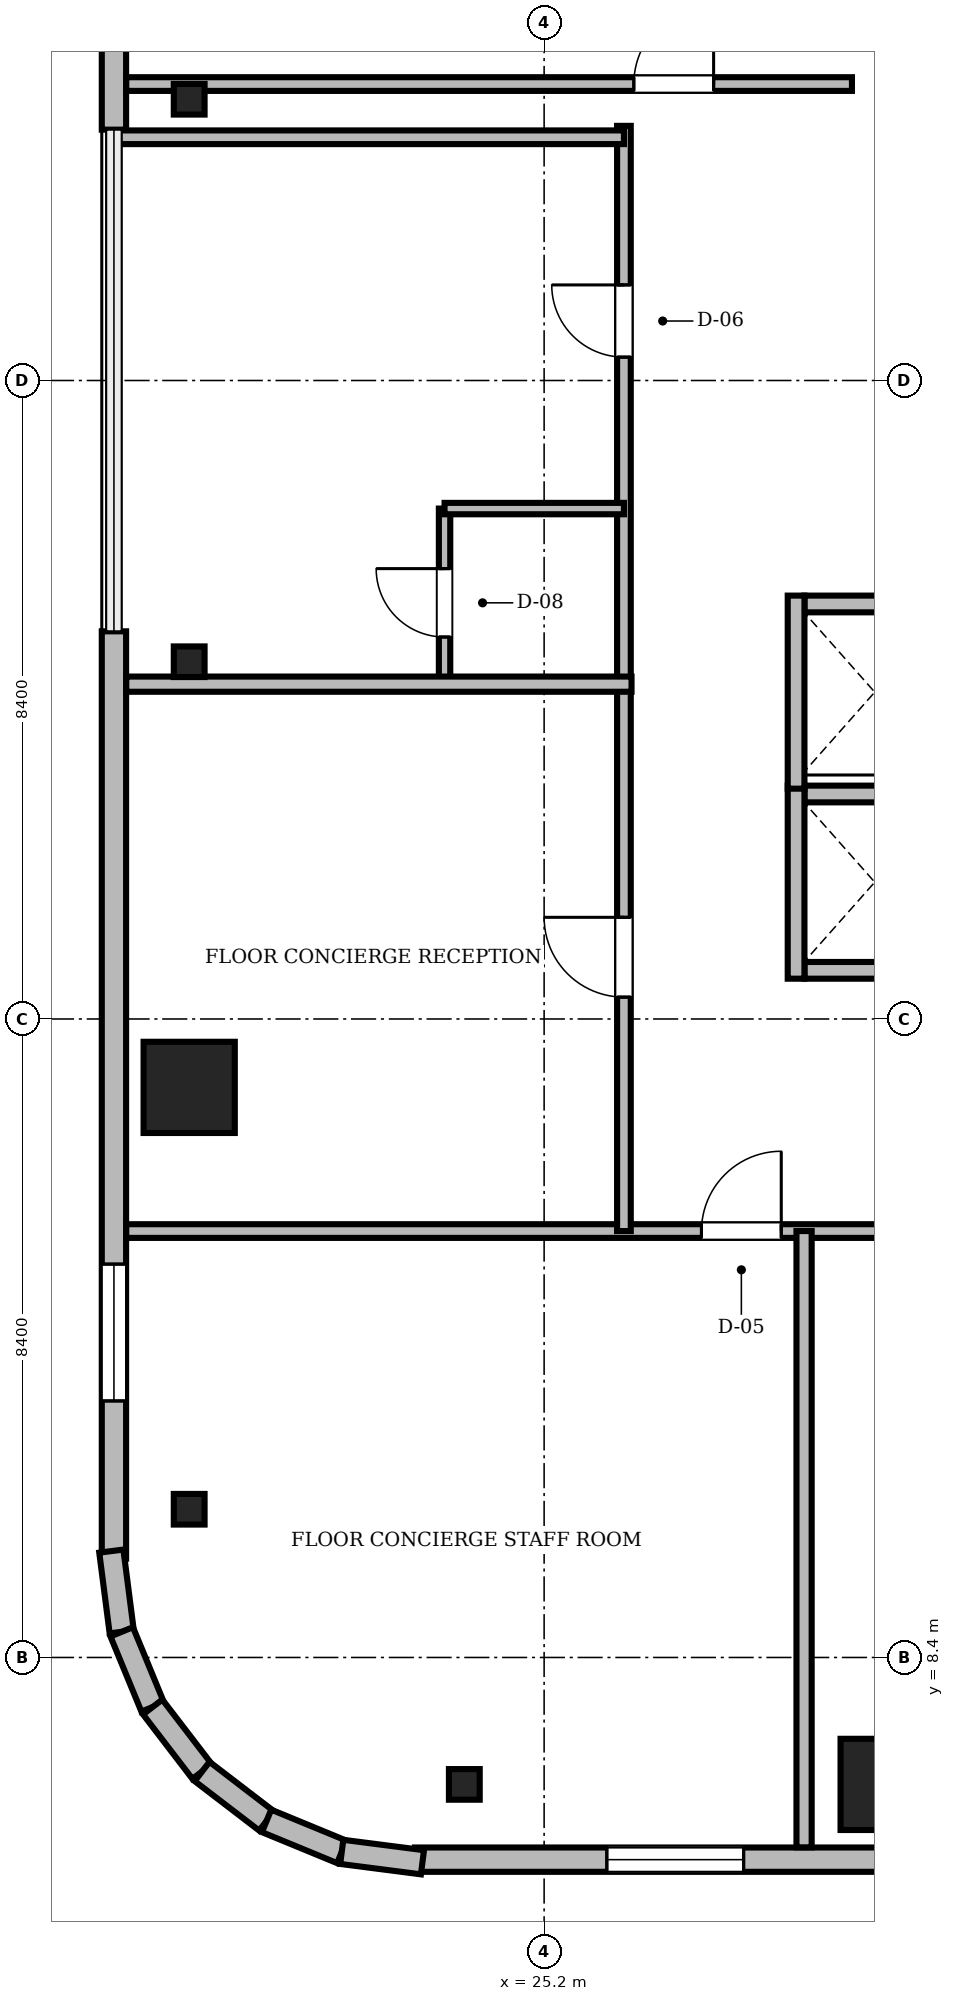
"""IFC4 building model, lengths in metres.
Left out: names, types, materials, properties, quantities, classifications, styles, units other than length and angle.
Written with IfcOpenShell. Run it as: python <this file> out.ifc"""

import sys

from ifc_helpers import new_model, si_unit, direction, frame, frame_2d, origin, origin_2d, place, context, subcontext, project, spatial, rectangle, i_section, extrude, source, transform, mapped, element, fill, save


model = new_model("IFC4")
c1 = context("Model", 3, precision=1e-05, world=origin(), true_north=direction((0.0, 1.0)))
c2 = subcontext(c1, "Body", "Model", "MODEL_VIEW")
j1 = project(units=[si_unit("LENGTHUNIT", "METRE"), si_unit("PLANEANGLEUNIT", "RADIAN")], contexts=[c1])
p1 = place(None, origin())
s1 = spatial("IfcSite", under=j1, at=p1, CompositionType="ELEMENT")
p2 = place(p1, origin())
s2 = spatial("IfcBuilding", under=s1, at=p2, CompositionType="ELEMENT")
p3 = place(p2, frame((0.0, 0.0, 282.2)))
s3 = spatial("IfcBuildingStorey", under=s2, at=p3, CompositionType="ELEMENT", Elevation=282.2)
m1 = source(origin(), c2, "Body", "SweptSolid", [
    extrude(rectangle(XDim=1.2, YDim=1.2, at=origin_2d()), origin(), (0.0, 0.0, 1.0), 5.814),
])
p4 = place(p3, frame((29.7, 6.73, 0.0), z_axis=(0.818058492506, 0.092882937348, 0.567585291202), x_axis=(-0.11281585058, 0.99361591365, 0.0)))
e1 = element("IfcColumn", 1, at=p4, inside=s3, PredefinedType="COLUMN", context=c2, shape_type="MappedRepresentation", body=[
    mapped(m1, transform((0.0, 0.0, 0.0), scale=1.0)),
])
m2 = source(origin(), c2, "Body", "SweptSolid", [
    extrude(rectangle(XDim=1.2, YDim=1.2, at=origin_2d()), origin(), (0.0, 0.0, 1.0), 6.03),
])
p5 = place(p3, frame((20.53, 15.9, 0.0), z_axis=(0.835860360208, 0.042513726905, 0.547293377685), x_axis=(-0.050796573908, 0.998709020726, 0.0)))
e2 = element("IfcColumn", 2, at=p5, inside=s3, PredefinedType="COLUMN", context=c2, shape_type="MappedRepresentation", body=[
    mapped(m2, transform((0.0, 0.0, 0.0), scale=1.0)),
])
m3 = source(origin(), c2, "Body", "SweptSolid", [
    extrude(i_section(OverallWidth=0.405, OverallDepth=0.403, WebThickness=0.018, FlangeThickness=0.028, FilletRadius=0.015, at=origin_2d()), origin(), (0.0, 0.0, 1.0), 5.955),
])
p6 = place(p3, frame((24.15, 6.73, 0.0), z_axis=(0.827427261615, 0.090692686323, 0.554201193957), x_axis=(-0.1089555096, 0.99404662714, 0.0)))
e3 = element("IfcColumn", 3, at=p6, inside=s3, PredefinedType="COLUMN", context=c2, shape_type="MappedRepresentation", body=[
    mapped(m3, transform((0.0, 0.0, 0.0), scale=1.0)),
])
m4 = source(origin(), c2, "Body", "SweptSolid", [
    extrude(i_section(OverallWidth=0.405, OverallDepth=0.403, WebThickness=0.018, FlangeThickness=0.028, FilletRadius=0.015, at=origin_2d()), origin(), (0.0, 0.0, 1.0), 6.024),
])
for number, where, z_axis, x_axis in (
    (4, (20.53, 28.9, 0.0), (0.837, 0.0, 0.548), (0.0, 1.0, 0.0)),
    (5, (20.53, 21.5, 0.0), (0.837, 0.0, 0.548), (0.0, 1.0, 0.0)),
):
    element("IfcColumn", number, at=place(p3, frame(where, z_axis=z_axis, x_axis=x_axis)), inside=s3, PredefinedType="COLUMN", context=c2, shape_type="MappedRepresentation", body=[
        mapped(m4, transform((0.0, 0.0, 0.0), scale=1.0)),
    ])
m5 = source(origin(), c2, "Body", "SweptSolid", [
    extrude(i_section(OverallWidth=0.405, OverallDepth=0.403, WebThickness=0.018, FlangeThickness=0.028, FilletRadius=0.015, at=origin_2d()), origin(), (0.0, 0.0, 1.0), 6.039),
])
p7 = place(p3, frame((20.53, 10.35, 0.0), z_axis=(0.834523086314, 0.070702425788, 0.546417775514), x_axis=(-0.084419521225, 0.996430300842, 0.0)))
e6 = element("IfcColumn", 6, at=p7, inside=s3, PredefinedType="COLUMN", context=c2, shape_type="MappedRepresentation", body=[
    mapped(m5, transform((0.0, 0.0, 0.0), scale=1.0)),
])
m6 = source(origin(), c2, "Body", "SweptSolid", [
    extrude(rectangle(XDim=12.2, YDim=0.32, at=frame_2d((6.1, 0.0))), origin(), (0.0, 0.0, 1.0), 3.3),
])
p8 = place(p3, frame((23.5, 5.74, 0.0), z_axis=(0.0, 0.0, 1.0), x_axis=(1.0, 0.0, 0.0)))
e7 = element("IfcWall", 7, at=p8, inside=s3, PredefinedType="SOLIDWALL", context=c2, shape_type="MappedRepresentation", body=[
    mapped(m6, transform((0.0, 0.0, 0.0), scale=1.0)),
])
m7 = source(origin(), c2, "Body", "SweptSolid", [
    extrude(rectangle(XDim=1.8, YDim=2.4, at=frame_2d((0.9, 1.2))), frame((0.0, 0.17, 0.0), z_axis=(0.0, -1.0, 0.0), x_axis=(1.0, 0.0, 0.0)), (0.0, 0.0, 1.0), 0.34),
])
p9 = place(p8, frame((2.525, 0.0, 0.64)))
e8 = element("IfcOpeningElement", 8, at=p9, cuts=e7, PredefinedType="OPENING", context=c2, shape_type="MappedRepresentation", body=[
    mapped(m7, transform((0.0, 0.0, 0.0), scale=1.0)),
])
p10 = place(p3, frame((19.54, 40.7, 0.0), z_axis=(0.0, 0.0, 1.0), x_axis=(0.0, -1.0, 0.0)))
e9 = element("IfcWall", 9, at=p10, inside=s3, PredefinedType="SOLIDWALL", context=c2, shape_type="MappedRepresentation", body=[
    mapped(m6, transform((0.0, 0.0, 0.0), scale=1.0)),
])
m8 = source(origin(), c2, "Body", "SweptSolid", [
    extrude(rectangle(XDim=1.4, YDim=2.3, at=frame_2d((0.7, 1.15))), frame((0.0, 0.17, 0.0), z_axis=(0.0, -1.0, 0.0), x_axis=(1.0, 0.0, 0.0)), (0.0, 0.0, 1.0), 0.34),
])
p11 = place(p10, frame((7.516, 0.0, 0.0)))
e10 = element("IfcOpeningElement", 10, at=p11, cuts=e9, PredefinedType="OPENING", context=c2, shape_type="MappedRepresentation", body=[
    mapped(m8, transform((0.0, 0.0, 0.0), scale=1.0)),
])
p12 = place(p10, frame((2.525, 0.0, 0.64)))
e11 = element("IfcOpeningElement", 11, at=p12, cuts=e9, PredefinedType="OPENING", context=c2, shape_type="MappedRepresentation", body=[
    mapped(m7, transform((0.0, 0.0, 0.0), scale=1.0)),
])
p13 = place(p3, frame((19.54, 21.9, 0.0), z_axis=(0.0, 0.0, 1.0), x_axis=(0.0, -1.0, 0.0)))
e12 = element("IfcWall", 12, at=p13, inside=s3, PredefinedType="SOLIDWALL", context=c2, shape_type="MappedRepresentation", body=[
    mapped(m6, transform((0.0, 0.0, 0.0), scale=1.0)),
])
p14 = place(p13, frame((8.325, 0.0, 0.64)))
e13 = element("IfcOpeningElement", 13, at=p14, cuts=e12, PredefinedType="OPENING", context=c2, shape_type="MappedRepresentation", body=[
    mapped(m7, transform((0.0, 0.0, 0.0), scale=1.0)),
])
m9 = source(origin(), c2, "Body", "SweptSolid", [
    extrude(rectangle(XDim=1.071, YDim=0.32, at=frame_2d((0.535, 0.0))), origin(), (0.0, 0.0, 1.0), 3.3),
])
p15 = place(p3, frame((19.506, 9.799, 0.0), z_axis=(0.0, 0.0, 1.0), x_axis=(0.127710832249, -0.99181144545, 0.0)))
e14 = element("IfcWall", 14, at=p15, inside=s3, PredefinedType="SOLIDWALL", context=c2, shape_type="MappedRepresentation", body=[
    mapped(m9, transform((0.0, 0.0, 0.0), scale=1.0)),
])
m10 = source(origin(), c2, "Body", "SweptSolid", [
    extrude(rectangle(XDim=1.07, YDim=0.32, at=frame_2d((0.535, 0.0))), origin(), (0.0, 0.0, 1.0), 3.3),
])
p16 = place(p3, frame((19.642, 8.737, 0.0), z_axis=(0.0, 0.0, 1.0), x_axis=(0.380738324673, -0.92468282569, 0.0)))
e15 = element("IfcWall", 15, at=p16, inside=s3, PredefinedType="SOLIDWALL", context=c2, shape_type="MappedRepresentation", body=[
    mapped(m10, transform((0.0, 0.0, 0.0), scale=1.0)),
])
m11 = source(origin(), c2, "Body", "SweptSolid", [
    extrude(rectangle(XDim=1.069, YDim=0.32, at=frame_2d((0.535, 0.0))), origin(), (0.0, 0.0, 1.0), 3.3),
])
p17 = place(p3, frame((20.05, 7.748, 0.0), z_axis=(0.0, 0.0, 1.0), x_axis=(0.608407570543, -0.793624740104, 0.0)))
e16 = element("IfcWall", 16, at=p17, inside=s3, PredefinedType="SOLIDWALL", context=c2, shape_type="MappedRepresentation", body=[
    mapped(m11, transform((0.0, 0.0, 0.0), scale=1.0)),
])
m12 = source(origin(), c2, "Body", "SweptSolid", [
    extrude(rectangle(XDim=1.069, YDim=0.32, at=frame_2d((0.534, 0.0))), origin(), (0.0, 0.0, 1.0), 3.3),
])
p18 = place(p3, frame((20.7, 6.9, 0.0), z_axis=(0.0, 0.0, 1.0), x_axis=(0.793735015643, -0.60826369688, 0.0)))
e17 = element("IfcWall", 17, at=p18, inside=s3, PredefinedType="SOLIDWALL", context=c2, shape_type="MappedRepresentation", body=[
    mapped(m12, transform((0.0, 0.0, 0.0), scale=1.0)),
])
p19 = place(p3, frame((21.548, 6.25, 0.0), z_axis=(0.0, 0.0, 1.0), x_axis=(0.92460245023, -0.380933470608, 0.0)))
e18 = element("IfcWall", 18, at=p19, inside=s3, PredefinedType="SOLIDWALL", context=c2, shape_type="MappedRepresentation", body=[
    mapped(m10, transform((0.0, 0.0, 0.0), scale=1.0)),
])
p20 = place(p3, frame((22.537, 5.842, 0.0), z_axis=(0.0, 0.0, 1.0), x_axis=(0.99181144545, -0.127710832249, 0.0)))
e19 = element("IfcWall", 19, at=p20, inside=s3, PredefinedType="SOLIDWALL", context=c2, shape_type="MappedRepresentation", body=[
    mapped(m9, transform((0.0, 0.0, 0.0), scale=1.0)),
])
m13 = source(origin(), c2, "Body", "SweptSolid", [
    extrude(rectangle(XDim=1.85, YDim=0.22, at=frame_2d((0.925, 0.0))), origin(), (0.0, 0.0, 1.0), 3.3),
])
for number, where, z_axis, x_axis in (
    (20, (28.625, 17.44, 0.0), (0.0, 0.0, 1.0), (1.0, 0.0, 0.0)),
    (21, (28.625, 19.76, 0.0), (0.0, 0.0, 1.0), (1.0, 0.0, 0.0)),
):
    element("IfcWall", number, at=place(p3, frame(where, z_axis=z_axis, x_axis=x_axis)), inside=s3, PredefinedType="SOLIDWALL", context=c2, shape_type="MappedRepresentation", body=[
        mapped(m13, transform((0.0, 0.0, 0.0), scale=1.0)),
    ])
m14 = source(origin(), c2, "Body", "SweptSolid", [
    extrude(rectangle(XDim=2.54, YDim=0.22, at=frame_2d((1.27, 0.0))), origin(), (0.0, 0.0, 1.0), 3.3),
])
p21 = place(p3, frame((28.515, 17.33, 0.0), z_axis=(0.0, 0.0, 1.0), x_axis=(0.0, 1.0, 0.0)))
e22 = element("IfcWall", 22, at=p21, inside=s3, PredefinedType="SOLIDWALL", context=c2, shape_type="MappedRepresentation", body=[
    mapped(m14, transform((0.0, 0.0, 0.0), scale=1.0)),
])
p22 = place(p3, frame((28.625, 22.26, 0.0), z_axis=(0.0, 0.0, 1.0), x_axis=(1.0, 0.0, 0.0)))
e23 = element("IfcWall", 23, at=p22, inside=s3, PredefinedType="SOLIDWALL", context=c2, shape_type="MappedRepresentation", body=[
    mapped(m13, transform((0.0, 0.0, 0.0), scale=1.0)),
])
p23 = place(p3, frame((28.515, 19.83, 0.0), z_axis=(0.0, 0.0, 1.0), x_axis=(0.0, 1.0, 0.0)))
e24 = element("IfcWall", 24, at=p23, inside=s3, PredefinedType="SOLIDWALL", context=c2, shape_type="MappedRepresentation", body=[
    mapped(m14, transform((0.0, 0.0, 0.0), scale=1.0)),
])
m15 = source(origin(), c2, "Body", "SweptSolid", [
    extrude(rectangle(XDim=38.596, YDim=0.18, at=frame_2d((19.298, 0.0))), origin(), (0.0, 0.0, 1.0), 2.08),
])
p24 = place(p3, frame((19.702, 14.01, 0.0), z_axis=(0.0, 0.0, 1.0), x_axis=(1.0, 0.0, 0.0)))
e25 = element("IfcWall", 25, at=p24, inside=s3, PredefinedType="PARTITIONING", context=c2, shape_type="MappedRepresentation", body=[
    mapped(m15, transform((0.0, 0.0, 0.0), scale=1.0)),
])
m16 = source(origin(), c2, "Body", "SweptSolid", [
    extrude(rectangle(XDim=1.05, YDim=2.2, at=frame_2d((0.525, 1.1))), frame((0.0, 0.1, 0.0), z_axis=(0.0, -1.0, 0.0), x_axis=(1.0, 0.0, 0.0)), (0.0, 0.0, 1.0), 0.2),
])
p25 = place(p24, frame((7.568, 0.0, 0.0)))
e26 = element("IfcOpeningElement", 26, at=p25, cuts=e25, PredefinedType="OPENING", context=c2, shape_type="MappedRepresentation", body=[
    mapped(m16, transform((0.0, 0.0, 0.0), scale=1.0)),
])
p26 = place(p24, frame((11.731, 0.0, 0.0)))
e27 = element("IfcOpeningElement", 27, at=p26, cuts=e25, PredefinedType="OPENING", context=c2, shape_type="MappedRepresentation", body=[
    mapped(m16, transform((0.0, 0.0, 0.0), scale=1.0)),
])
p27 = place(p24, frame((18.398, 0.0, 0.0)))
e28 = element("IfcOpeningElement", 28, at=p27, cuts=e25, PredefinedType="OPENING", context=c2, shape_type="MappedRepresentation", body=[
    mapped(m16, transform((0.0, 0.0, 0.0), scale=1.0)),
])
p28 = place(p24, frame((25.065, 0.0, 0.0)))
e29 = element("IfcOpeningElement", 29, at=p28, cuts=e25, PredefinedType="OPENING", context=c2, shape_type="MappedRepresentation", body=[
    mapped(m16, transform((0.0, 0.0, 0.0), scale=1.0)),
])
p29 = place(p24, frame((30.018, 0.0, 0.0)))
e30 = element("IfcOpeningElement", 30, at=p29, cuts=e25, PredefinedType="OPENING", context=c2, shape_type="MappedRepresentation", body=[
    mapped(m16, transform((0.0, 0.0, 0.0), scale=1.0)),
])
m17 = source(origin(), c2, "Body", "SweptSolid", [
    extrude(rectangle(XDim=14.54, YDim=0.18, at=frame_2d((7.27, 0.0))), origin(), (0.0, 0.0, 1.0), 2.478),
])
p30 = place(p3, frame((26.25, 14.01, 0.0), z_axis=(0.0, 0.0, 1.0), x_axis=(0.0, 1.0, 0.0)))
e31 = element("IfcWall", 31, at=p30, inside=s3, PredefinedType="PARTITIONING", context=c2, shape_type="MappedRepresentation", body=[
    mapped(m17, transform((0.0, 0.0, 0.0), scale=1.0)),
])
p31 = place(p30, frame((3.077, 0.0, 0.0)))
e32 = element("IfcOpeningElement", 32, at=p31, cuts=e31, PredefinedType="OPENING", context=c2, shape_type="MappedRepresentation", body=[
    mapped(m16, transform((0.0, 0.0, 0.0), scale=1.0)),
])
m18 = source(origin(), c2, "Body", "SweptSolid", [
    extrude(rectangle(XDim=0.95, YDim=2.15, at=frame_2d((0.475, 1.075))), frame((0.0, 0.1, 0.0), z_axis=(0.0, -1.0, 0.0), x_axis=(1.0, 0.0, 0.0)), (0.0, 0.0, 1.0), 0.2),
])
p32 = place(p30, frame((11.498, 0.0, 0.0)))
e33 = element("IfcOpeningElement", 33, at=p32, cuts=e31, PredefinedType="OPENING", context=c2, shape_type="MappedRepresentation", body=[
    mapped(m18, transform((0.0, 0.0, 0.0), scale=1.0)),
])
m19 = source(origin(), c2, "Body", "SweptSolid", [
    extrude(rectangle(XDim=9.548, YDim=0.18, at=frame_2d((4.774, 0.0))), origin(), (0.0, 0.0, 1.0), 2.08),
])
p33 = place(p3, frame((19.702, 29.1, 0.0), z_axis=(0.0, 0.0, 1.0), x_axis=(1.0, 0.0, 0.0)))
e34 = element("IfcWall", 34, at=p33, inside=s3, PredefinedType="PARTITIONING", context=c2, shape_type="MappedRepresentation", body=[
    mapped(m19, transform((0.0, 0.0, 0.0), scale=1.0)),
])
p34 = place(p33, frame((6.678, 0.0, 0.0)))
e35 = element("IfcOpeningElement", 35, at=p34, cuts=e34, PredefinedType="OPENING", context=c2, shape_type="MappedRepresentation", body=[
    mapped(m16, transform((0.0, 0.0, 0.0), scale=1.0)),
])
m20 = source(origin(), c2, "Body", "SweptSolid", [
    extrude(rectangle(XDim=2.29, YDim=0.15, at=frame_2d((1.145, 0.0))), origin(), (0.0, 0.0, 1.0), 3.3),
])
p35 = place(p3, frame((23.89, 21.225, 0.0), z_axis=(0.0, 0.0, 1.0), x_axis=(0.0, 1.0, 0.0)))
e36 = element("IfcWall", 36, at=p35, inside=s3, PredefinedType="PARTITIONING", context=c2, shape_type="MappedRepresentation", body=[
    mapped(m20, transform((0.0, 0.0, 0.0), scale=1.0)),
])
m21 = source(origin(), c2, "Body", "SweptSolid", [
    extrude(rectangle(XDim=0.9, YDim=2.1, at=frame_2d((0.45, 1.05))), frame((0.0, 0.085, 0.0), z_axis=(0.0, -1.0, 0.0), x_axis=(1.0, 0.0, 0.0)), (0.0, 0.0, 1.0), 0.17),
])
p36 = place(p35, frame((0.6, 0.0, 0.0)))
e37 = element("IfcOpeningElement", 37, at=p36, cuts=e36, PredefinedType="OPENING", context=c2, shape_type="MappedRepresentation", body=[
    mapped(m21, transform((0.0, 0.0, 0.0), scale=1.0)),
])
m22 = source(origin(), c2, "Body", "SweptSolid", [
    extrude(rectangle(XDim=8.108, YDim=0.2, at=frame_2d((4.054, 0.0))), origin(), (0.0, 0.0, 1.0), 2.08),
])
p37 = place(p3, frame((28.62, 5.902, 0.0), z_axis=(0.0, 0.0, 1.0), x_axis=(0.0, 1.0, 0.0)))
e38 = element("IfcWall", 38, at=p37, inside=s3, PredefinedType="PARTITIONING", context=c2, shape_type="MappedRepresentation", body=[
    mapped(m22, transform((0.0, 0.0, 0.0), scale=1.0)),
])
m23 = source(origin(), c2, "Body", "SweptSolid", [
    extrude(rectangle(XDim=6.648, YDim=0.2, at=frame_2d((3.324, 0.0))), origin(), (0.0, 0.0, 1.0), 2.08),
])
p38 = place(p3, frame((19.702, 21.205, 0.0), z_axis=(0.0, 0.0, 1.0), x_axis=(1.0, 0.0, 0.0)))
e39 = element("IfcWall", 39, at=p38, inside=s3, PredefinedType="PARTITIONING", context=c2, shape_type="MappedRepresentation", body=[
    mapped(m23, transform((0.0, 0.0, 0.0), scale=1.0)),
])
m24 = source(origin(), c2, "Body", "SweptSolid", [
    extrude(rectangle(XDim=6.74, YDim=0.18, at=frame_2d((3.37, 0.0))), origin(), (0.0, 0.0, 1.0), 2.08),
])
p39 = place(p3, frame((19.51, 28.4, 0.0), z_axis=(0.0, 0.0, 1.0), x_axis=(1.0, 0.0, 0.0)))
e40 = element("IfcWall", 40, at=p39, inside=s3, PredefinedType="PARTITIONING", context=c2, shape_type="MappedRepresentation", body=[
    mapped(m24, transform((0.0, 0.0, 0.0), scale=1.0)),
])
m25 = source(origin(), c2, "Body", "SweptSolid", [
    extrude(rectangle(XDim=2.36, YDim=0.15, at=frame_2d((1.18, 0.0))), origin(), (0.0, 0.0, 1.0), 2.08),
])
p40 = place(p3, frame((23.89, 23.515, 0.0), z_axis=(0.0, 0.0, 1.0), x_axis=(1.0, 0.0, 0.0)))
e41 = element("IfcWall", 41, at=p40, inside=s3, PredefinedType="PARTITIONING", context=c2, shape_type="MappedRepresentation", body=[
    mapped(m25, transform((0.0, 0.0, 0.0), scale=1.0)),
])
m26 = source(origin(), c2, "Body", "SweptSolid", [
    extrude(rectangle(XDim=1.8, YDim=2.4, at=frame_2d((0.9, 1.2))), frame((0.0, 0.03, 0.0), z_axis=(0.0, -1.0, 0.0), x_axis=(1.0, 0.0, 0.0)), (0.0, 0.0, 1.0), 0.06),
])
p41 = place(p9, origin())
e42 = element("IfcWindow", 42, at=p41, inside=s3, PartitioningType="SINGLE_PANEL", PredefinedType="WINDOW", context=c2, shape_type="MappedRepresentation", body=[
    mapped(m26, transform((0.0, 0.0, 0.0), scale=1.0)),
])
fill(e8, e42)
p42 = place(p14, origin())
e43 = element("IfcWindow", 43, at=p42, inside=s3, PartitioningType="SINGLE_PANEL", PredefinedType="WINDOW", context=c2, shape_type="MappedRepresentation", body=[
    mapped(m26, transform((0.0, 0.0, 0.0), scale=1.0)),
])
fill(e13, e43)
m27 = source(origin(), c2, "Body", "SweptSolid", [
    extrude(rectangle(XDim=1.05, YDim=2.2, at=frame_2d((0.525, 1.1))), frame((0.0, 0.025, 0.0), z_axis=(0.0, -1.0, 0.0), x_axis=(1.0, 0.0, 0.0)), (0.0, 0.0, 1.0), 0.05),
])
p43 = place(p25, origin())
e44 = element("IfcDoor", 44, at=p43, inside=s3, OperationType="SINGLE_SWING_RIGHT", PredefinedType="DOOR", context=c2, shape_type="MappedRepresentation", body=[
    mapped(m27, transform((0.0, 0.0, 0.0), scale=1.0)),
])
fill(e26, e44)
p44 = place(p31, origin())
e45 = element("IfcDoor", 45, at=p44, inside=s3, OperationType="SINGLE_SWING_RIGHT", PredefinedType="DOOR", context=c2, shape_type="MappedRepresentation", body=[
    mapped(m27, transform((0.0, 0.0, 0.0), scale=1.0)),
])
fill(e32, e45)
m28 = source(origin(), c2, "Body", "SweptSolid", [
    extrude(rectangle(XDim=0.95, YDim=2.15, at=frame_2d((0.475, 1.075))), frame((0.0, 0.025, 0.0), z_axis=(0.0, -1.0, 0.0), x_axis=(1.0, 0.0, 0.0)), (0.0, 0.0, 1.0), 0.05),
])
p45 = place(p32, origin())
e46 = element("IfcDoor", 46, at=p45, inside=s3, OperationType="SINGLE_SWING_RIGHT", PredefinedType="DOOR", context=c2, shape_type="MappedRepresentation", body=[
    mapped(m28, transform((0.0, 0.0, 0.0), scale=1.0)),
])
fill(e33, e46)
p46 = place(p34, origin())
e47 = element("IfcDoor", 47, at=p46, inside=s3, OperationType="SINGLE_SWING_RIGHT", PredefinedType="DOOR", context=c2, shape_type="MappedRepresentation", body=[
    mapped(m27, transform((0.0, 0.0, 0.0), scale=1.0)),
])
fill(e35, e47)
m29 = source(origin(), c2, "Body", "SweptSolid", [
    extrude(rectangle(XDim=0.9, YDim=2.1, at=frame_2d((0.45, 1.05))), frame((0.0, 0.025, 0.0), z_axis=(0.0, -1.0, 0.0), x_axis=(1.0, 0.0, 0.0)), (0.0, 0.0, 1.0), 0.05),
])
p47 = place(p36, origin())
e48 = element("IfcDoor", 48, at=p47, inside=s3, OperationType="SINGLE_SWING_RIGHT", PredefinedType="DOOR", context=c2, shape_type="MappedRepresentation", body=[
    mapped(m29, transform((0.0, 0.0, 0.0), scale=1.0)),
])
fill(e37, e48)
save(model, sys.argv[1])
